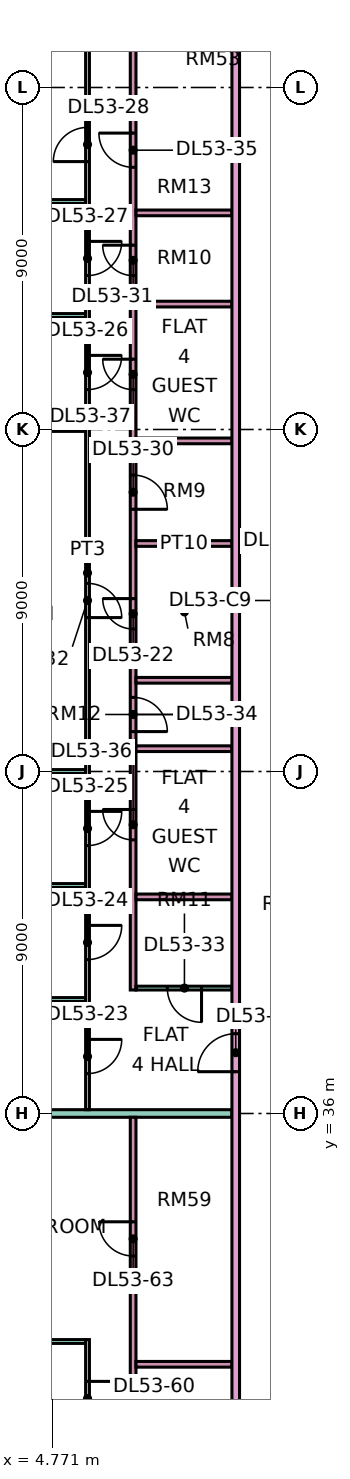
"""IFC4 building model, lengths in metres.
Left out: names, types, materials, properties, quantities, classifications, styles, units other than length and angle.
Written with IfcOpenShell. Run it as: python <this file> out.ifc"""

import sys

from ifc_helpers import new_model, si_unit, direction, frame, frame_2d, origin, place, context, subcontext, project, spatial, rectangle, extrude, element, fill, save


model = new_model("IFC4")
c1 = context("Model", 3, precision=1e-05, world=origin(), true_north=direction((0.0, 1.0)))
c2 = subcontext(c1, "Body", "Model", "MODEL_VIEW")
j1 = project(units=[si_unit("LENGTHUNIT", "METRE"), si_unit("PLANEANGLEUNIT", "RADIAN")], contexts=[c1])
p1 = place(None, origin())
s1 = spatial("IfcSite", under=j1, at=p1, CompositionType="ELEMENT")
p2 = place(p1, origin())
s2 = spatial("IfcBuilding", under=s1, at=p2, CompositionType="ELEMENT")
p3 = place(p2, frame((0.0, 0.0, 226.65)))
s3 = spatial("IfcBuildingStorey", under=s2, at=p3, CompositionType="ELEMENT", Elevation=226.65)
for number, where, z_axis, x_axis in (
    (1, (-1.351, 57.0, 0.0), (0.0, 0.0, 1.0), (1.0, 0.0, 0.0)),
    (2, (-1.351, 60.0, 0.0), (0.0, 0.0, 1.0), (1.0, 0.0, 0.0)),
):
    element("IfcWall", number, at=place(p3, frame(where, z_axis=z_axis, x_axis=x_axis)), inside=s3, PredefinedType="PARTITIONING", context=c2, shape_type="SweptSolid", body=[
        extrude(rectangle(XDim=7.001, YDim=0.1, at=frame_2d((3.5, 0.0))), origin(), (0.0, 0.0, 1.0), 3.35),
    ])
p4 = place(p3, frame((-1.35, 30.0, 0.0), z_axis=(0.0, 0.0, 1.0), x_axis=(1.0, 0.0, 0.0)))
e3 = element("IfcWall", 3, at=p4, inside=s3, PredefinedType="PARTITIONING", context=c2, shape_type="SweptSolid", body=[
    extrude(rectangle(XDim=7.0, YDim=0.1, at=frame_2d((3.5, 0.0))), origin(), (0.0, 0.0, 1.0), 3.35),
])
p5 = place(p3, frame((0.0, 36.0, 0.0), z_axis=(0.0, 0.0, 1.0), x_axis=(1.0, 0.0, 0.0)))
e4 = element("IfcWall", 4, at=p5, inside=s3, PredefinedType="PARTITIONING", context=c2, shape_type="SweptSolid", body=[
    extrude(rectangle(XDim=9.5, YDim=0.2, at=frame_2d((4.75, 0.0))), origin(), (0.0, 0.0, 1.0), 3.35),
])
p6 = place(p3, frame((0.0, 54.0, 0.0), z_axis=(0.0, 0.0, 1.0), x_axis=(1.0, 0.0, 0.0)))
e5 = element("IfcWall", 5, at=p6, inside=s3, PredefinedType="PARTITIONING", context=c2, shape_type="SweptSolid", body=[
    extrude(rectangle(XDim=5.65, YDim=0.1, at=frame_2d((2.825, 0.0))), origin(), (0.0, 0.0, 1.0), 3.35),
])
for number, where, z_axis, x_axis in (
    (6, (0.074, 39.0, 0.0), (0.0, 0.0, 1.0), (1.0, 0.0, 0.0)),
    (7, (0.074, 42.0, 0.0), (0.0, 0.0, 1.0), (1.0, 0.0, 0.0)),
    (8, (0.074, 45.0, 0.0), (0.0, 0.0, 1.0), (1.0, 0.0, 0.0)),
):
    element("IfcWall", number, at=place(p3, frame(where, z_axis=z_axis, x_axis=x_axis)), inside=s3, PredefinedType="PARTITIONING", context=c2, shape_type="SweptSolid", body=[
        extrude(rectangle(XDim=5.576, YDim=0.1, at=frame_2d((2.788, 0.0))), origin(), (0.0, 0.0, 1.0), 3.35),
    ])
p7 = place(p3, frame((5.7, 22.5, 0.0), z_axis=(0.0, 0.0, 1.0), x_axis=(0.0, 1.0, 0.0)))
e9 = element("IfcWall", 9, at=p7, inside=s3, PredefinedType="PARTITIONING", context=c2, shape_type="SweptSolid", body=[
    extrude(rectangle(XDim=7.55, YDim=0.1, at=frame_2d((3.775, 0.0))), origin(), (0.0, 0.0, 1.0), 3.35),
])
p8 = place(p7, frame((1.8, 0.0, 0.0)))
e10 = element("IfcOpeningElement", 10, at=p8, cuts=e9, PredefinedType="OPENING", context=c2, shape_type="SweptSolid", body=[
    extrude(rectangle(XDim=0.9, YDim=2.1, at=frame_2d((0.45, 1.05))), frame((0.0, 0.06, 0.0), z_axis=(0.0, -1.0, 0.0), x_axis=(1.0, 0.0, 0.0)), (0.0, 0.0, 1.0), 0.12),
])
p9 = place(p7, frame((5.55, 0.0, 0.0)))
e11 = element("IfcOpeningElement", 11, at=p9, cuts=e9, PredefinedType="OPENING", context=c2, shape_type="SweptSolid", body=[
    extrude(rectangle(XDim=0.9, YDim=2.1, at=frame_2d((0.45, 1.05))), frame((0.0, 0.06, 0.0), z_axis=(0.0, -1.0, 0.0), x_axis=(1.0, 0.0, 0.0)), (0.0, 0.0, 1.0), 0.12),
])
p10 = place(p3, frame((5.7, 36.1, 0.0), z_axis=(0.0, 0.0, 1.0), x_axis=(0.0, 1.0, 0.0)))
e12 = element("IfcWall", 12, at=p10, inside=s3, PredefinedType="PARTITIONING", context=c2, shape_type="SweptSolid", body=[
    extrude(rectangle(XDim=28.25, YDim=0.1, at=frame_2d((14.125, 0.0))), origin(), (0.0, 0.0, 1.0), 3.35),
])
p11 = place(p10, frame((0.95, 0.0, 0.0)))
e13 = element("IfcOpeningElement", 13, at=p11, cuts=e12, PredefinedType="OPENING", context=c2, shape_type="SweptSolid", body=[
    extrude(rectangle(XDim=0.9, YDim=2.1, at=frame_2d((0.45, 1.05))), frame((0.0, 0.06, 0.0), z_axis=(0.0, -1.0, 0.0), x_axis=(1.0, 0.0, 0.0)), (0.0, 0.0, 1.0), 0.12),
])
p12 = place(p10, frame((3.95, 0.0, 0.0)))
e14 = element("IfcOpeningElement", 14, at=p12, cuts=e12, PredefinedType="OPENING", context=c2, shape_type="SweptSolid", body=[
    extrude(rectangle(XDim=0.9, YDim=2.1, at=frame_2d((0.45, 1.05))), frame((0.0, 0.06, 0.0), z_axis=(0.0, -1.0, 0.0), x_axis=(1.0, 0.0, 0.0)), (0.0, 0.0, 1.0), 0.12),
])
p13 = place(p10, frame((6.95, 0.0, 0.0)))
e15 = element("IfcOpeningElement", 15, at=p13, cuts=e12, PredefinedType="OPENING", context=c2, shape_type="SweptSolid", body=[
    extrude(rectangle(XDim=0.9, YDim=2.1, at=frame_2d((0.45, 1.05))), frame((0.0, 0.06, 0.0), z_axis=(0.0, -1.0, 0.0), x_axis=(1.0, 0.0, 0.0)), (0.0, 0.0, 1.0), 0.12),
])
p14 = place(p10, frame((18.95, 0.0, 0.0)))
e16 = element("IfcOpeningElement", 16, at=p14, cuts=e12, PredefinedType="OPENING", context=c2, shape_type="SweptSolid", body=[
    extrude(rectangle(XDim=0.9, YDim=2.1, at=frame_2d((0.45, 1.05))), frame((0.0, 0.06, 0.0), z_axis=(0.0, -1.0, 0.0), x_axis=(1.0, 0.0, 0.0)), (0.0, 0.0, 1.0), 0.12),
])
p15 = place(p10, frame((21.95, 0.0, 0.0)))
e17 = element("IfcOpeningElement", 17, at=p15, cuts=e12, PredefinedType="OPENING", context=c2, shape_type="SweptSolid", body=[
    extrude(rectangle(XDim=0.9, YDim=2.1, at=frame_2d((0.45, 1.05))), frame((0.0, 0.06, 0.0), z_axis=(0.0, -1.0, 0.0), x_axis=(1.0, 0.0, 0.0)), (0.0, 0.0, 1.0), 0.12),
])
p16 = place(p10, frame((24.95, 0.0, 0.0)))
e18 = element("IfcOpeningElement", 18, at=p16, cuts=e12, PredefinedType="OPENING", context=c2, shape_type="SweptSolid", body=[
    extrude(rectangle(XDim=0.9, YDim=2.1, at=frame_2d((0.45, 1.05))), frame((0.0, 0.06, 0.0), z_axis=(0.0, -1.0, 0.0), x_axis=(1.0, 0.0, 0.0)), (0.0, 0.0, 1.0), 0.12),
])
p17 = place(p10, frame((12.95, 0.0, 0.0)))
e19 = element("IfcOpeningElement", 19, at=p17, cuts=e12, PredefinedType="OPENING", context=c2, shape_type="SweptSolid", body=[
    extrude(rectangle(XDim=0.9, YDim=2.1, at=frame_2d((0.45, 1.05))), frame((0.0, 0.06, 0.0), z_axis=(0.0, -1.0, 0.0), x_axis=(1.0, 0.0, 0.0)), (0.0, 0.0, 1.0), 0.12),
])
p18 = place(p3, frame((6.9, 26.325, 0.0), z_axis=(0.0, 0.0, 1.0), x_axis=(0.0, 1.0, 0.0)))
e20 = element("IfcWall", 20, at=p18, inside=s3, PredefinedType="PARTITIONING", context=c2, shape_type="SweptSolid", body=[
    extrude(rectangle(XDim=9.575, YDim=0.15, at=frame_2d((4.788, 0.0))), origin(), (0.0, 0.0, 1.0), 3.35),
])
p19 = place(p18, frame((1.125, 0.0, 0.0)))
e21 = element("IfcOpeningElement", 21, at=p19, cuts=e20, PredefinedType="OPENING", context=c2, shape_type="SweptSolid", body=[
    extrude(rectangle(XDim=0.8, YDim=2.1, at=frame_2d((0.4, 1.05))), frame((0.0, 0.085, 0.0), z_axis=(0.0, -1.0, 0.0), x_axis=(1.0, 0.0, 0.0)), (0.0, 0.0, 1.0), 0.17),
])
p20 = place(p18, frame((5.925, 0.0, 0.0)))
e22 = element("IfcOpeningElement", 22, at=p20, cuts=e20, PredefinedType="OPENING", context=c2, shape_type="SweptSolid", body=[
    extrude(rectangle(XDim=0.9, YDim=2.1, at=frame_2d((0.45, 1.05))), frame((0.0, 0.085, 0.0), z_axis=(0.0, -1.0, 0.0), x_axis=(1.0, 0.0, 0.0)), (0.0, 0.0, 1.0), 0.17),
])
p21 = place(p3, frame((6.9, 39.25, 0.0), z_axis=(0.0, 0.0, 1.0), x_axis=(0.0, 1.0, 0.0)))
e23 = element("IfcWall", 23, at=p21, inside=s3, PredefinedType="PARTITIONING", context=c2, shape_type="SweptSolid", body=[
    extrude(rectangle(XDim=25.1, YDim=0.15, at=frame_2d((12.55, 0.0))), origin(), (0.0, 0.0, 1.0), 3.35),
])
p22 = place(p21, frame((9.5, 0.0, 0.0)))
e24 = element("IfcOpeningElement", 24, at=p22, cuts=e23, PredefinedType="OPENING", context=c2, shape_type="SweptSolid", body=[
    extrude(rectangle(XDim=0.8, YDim=2.1, at=frame_2d((0.4, 1.05))), frame((0.0, 0.085, 0.0), z_axis=(0.0, -1.0, 0.0), x_axis=(1.0, 0.0, 0.0)), (0.0, 0.0, 1.0), 0.17),
])
p23 = place(p21, frame((12.65, 0.0, 0.0)))
e25 = element("IfcOpeningElement", 25, at=p23, cuts=e23, PredefinedType="OPENING", context=c2, shape_type="SweptSolid", body=[
    extrude(rectangle(XDim=0.9, YDim=2.1, at=frame_2d((0.45, 1.05))), frame((0.0, 0.085, 0.0), z_axis=(0.0, -1.0, 0.0), x_axis=(1.0, 0.0, 0.0)), (0.0, 0.0, 1.0), 0.17),
])
p24 = place(p21, frame((18.8, 0.0, 0.0)))
e26 = element("IfcOpeningElement", 26, at=p24, cuts=e23, PredefinedType="OPENING", context=c2, shape_type="SweptSolid", body=[
    extrude(rectangle(XDim=0.8, YDim=2.1, at=frame_2d((0.4, 1.05))), frame((0.0, 0.085, 0.0), z_axis=(0.0, -1.0, 0.0), x_axis=(1.0, 0.0, 0.0)), (0.0, 0.0, 1.0), 0.17),
])
p25 = place(p21, frame((6.8, 0.0, 0.0)))
e27 = element("IfcOpeningElement", 27, at=p25, cuts=e23, PredefinedType="OPENING", context=c2, shape_type="SweptSolid", body=[
    extrude(rectangle(XDim=0.9, YDim=2.1, at=frame_2d((0.45, 1.05))), frame((0.0, 0.085, 0.0), z_axis=(0.0, -1.0, 0.0), x_axis=(1.0, 0.0, 0.0)), (0.0, 0.0, 1.0), 0.17),
])
p26 = place(p21, frame((21.65, 0.0, 0.0)))
e28 = element("IfcOpeningElement", 28, at=p26, cuts=e23, PredefinedType="OPENING", context=c2, shape_type="SweptSolid", body=[
    extrude(rectangle(XDim=0.9, YDim=2.1, at=frame_2d((0.45, 1.05))), frame((0.0, 0.085, 0.0), z_axis=(0.0, -1.0, 0.0), x_axis=(1.0, 0.0, 0.0)), (0.0, 0.0, 1.0), 0.17),
])
p27 = place(p21, frame((3.95, 0.0, 0.0)))
e29 = element("IfcOpeningElement", 29, at=p27, cuts=e23, PredefinedType="OPENING", context=c2, shape_type="SweptSolid", body=[
    extrude(rectangle(XDim=0.8, YDim=2.1, at=frame_2d((0.4, 1.05))), frame((0.0, 0.085, 0.0), z_axis=(0.0, -1.0, 0.0), x_axis=(1.0, 0.0, 0.0)), (0.0, 0.0, 1.0), 0.17),
])
p28 = place(p21, frame((15.8, 0.0, 0.0)))
e30 = element("IfcOpeningElement", 30, at=p28, cuts=e23, PredefinedType="OPENING", context=c2, shape_type="SweptSolid", body=[
    extrude(rectangle(XDim=0.8, YDim=2.1, at=frame_2d((0.4, 1.05))), frame((0.0, 0.085, 0.0), z_axis=(0.0, -1.0, 0.0), x_axis=(1.0, 0.0, 0.0)), (0.0, 0.0, 1.0), 0.17),
])
p29 = place(p3, frame((6.975, 29.4, 0.0), z_axis=(0.0, 0.0, 1.0), x_axis=(1.0, 0.0, 0.0)))
e31 = element("IfcWall", 31, at=p29, inside=s3, PredefinedType="PARTITIONING", context=c2, shape_type="SweptSolid", body=[
    extrude(rectangle(XDim=2.525, YDim=0.15, at=frame_2d((1.262, 0.0))), origin(), (0.0, 0.0, 1.0), 3.35),
])
p30 = place(p3, frame((6.975, 39.3, 0.0), z_axis=(0.0, 0.0, 1.0), x_axis=(1.0, 0.0, 0.0)))
e32 = element("IfcWall", 32, at=p30, inside=s3, PredefinedType="PARTITIONING", context=c2, shape_type="SweptSolid", body=[
    extrude(rectangle(XDim=2.525, YDim=0.1, at=frame_2d((1.262, 0.0))), origin(), (0.0, 0.0, 1.0), 3.35),
])
p31 = place(p30, frame((0.825, 0.0, 0.0)))
e33 = element("IfcOpeningElement", 33, at=p31, cuts=e32, PredefinedType="OPENING", context=c2, shape_type="SweptSolid", body=[
    extrude(rectangle(XDim=0.9, YDim=2.1, at=frame_2d((0.45, 1.05))), frame((0.0, 0.06, 0.0), z_axis=(0.0, -1.0, 0.0), x_axis=(1.0, 0.0, 0.0)), (0.0, 0.0, 1.0), 0.12),
])
for number, where, z_axis, x_axis in (
    (34, (6.975, 41.7, 0.0), (0.0, 0.0, 1.0), (1.0, 0.0, 0.0)),
    (35, (6.975, 45.6, 0.0), (0.0, 0.0, 1.0), (1.0, 0.0, 0.0)),
    (36, (6.975, 47.4, 0.0), (0.0, 0.0, 1.0), (1.0, 0.0, 0.0)),
    (37, (6.975, 51.0, 0.0), (0.0, 0.0, 1.0), (1.0, 0.0, 0.0)),
    (38, (6.975, 53.7, 0.0), (0.0, 0.0, 1.0), (1.0, 0.0, 0.0)),
    (39, (6.975, 57.3, 0.0), (0.0, 0.0, 1.0), (1.0, 0.0, 0.0)),
    (40, (6.975, 59.7, 0.0), (0.0, 0.0, 1.0), (1.0, 0.0, 0.0)),
):
    element("IfcWall", number, at=place(p3, frame(where, z_axis=z_axis, x_axis=x_axis)), inside=s3, PredefinedType="PARTITIONING", context=c2, shape_type="SweptSolid", body=[
        extrude(rectangle(XDim=2.525, YDim=0.15, at=frame_2d((1.262, 0.0))), origin(), (0.0, 0.0, 1.0), 3.35),
    ])
p32 = place(p3, frame((9.6, 20.0, 0.0), z_axis=(0.0, 0.0, 1.0), x_axis=(0.0, 1.0, 0.0)))
e41 = element("IfcWall", 41, at=p32, inside=s3, PredefinedType="PARTITIONING", context=c2, shape_type="SweptSolid", body=[
    extrude(rectangle(XDim=44.35, YDim=0.2, at=frame_2d((22.175, 0.0))), origin(), (0.0, 0.0, 1.0), 3.35),
])
p33 = place(p32, frame((17.1, 0.0, 0.0)))
e42 = element("IfcOpeningElement", 42, at=p33, cuts=e41, PredefinedType="OPENING", context=c2, shape_type="SweptSolid", body=[
    extrude(rectangle(XDim=1.0, YDim=2.1, at=frame_2d((0.5, 1.05))), frame((0.0, 0.11, 0.0), z_axis=(0.0, -1.0, 0.0), x_axis=(1.0, 0.0, 0.0)), (0.0, 0.0, 1.0), 0.22),
])
p34 = place(p32, frame((0.6, 0.0, 0.0)))
e43 = element("IfcOpeningElement", 43, at=p34, cuts=e41, PredefinedType="OPENING", context=c2, shape_type="SweptSolid", body=[
    extrude(rectangle(XDim=1.2, YDim=2.1, at=frame_2d((0.6, 1.05))), frame((0.0, 0.11, 0.0), z_axis=(0.0, -1.0, 0.0), x_axis=(1.0, 0.0, 0.0)), (0.0, 0.0, 1.0), 0.22),
])
p35 = place(p32, frame((3.9, 0.0, 0.0)))
e44 = element("IfcOpeningElement", 44, at=p35, cuts=e41, PredefinedType="OPENING", context=c2, shape_type="SweptSolid", body=[
    extrude(rectangle(XDim=1.0, YDim=2.1, at=frame_2d((0.5, 1.05))), frame((0.0, 0.11, 0.0), z_axis=(0.0, -1.0, 0.0), x_axis=(1.0, 0.0, 0.0)), (0.0, 0.0, 1.0), 0.22),
])
p36 = place(p22, frame((0.8, 0.0, 0.0), z_axis=(0.0, 0.0, 1.0), x_axis=(-1.0, 0.0, 0.0)))
e45 = element("IfcDoor", 45, at=p36, inside=s3, OperationType="SINGLE_SWING_RIGHT", PredefinedType="DOOR", context=c2, shape_type="SweptSolid", body=[
    extrude(rectangle(XDim=0.8, YDim=2.1, at=frame_2d((0.4, 1.05))), frame((0.0, 0.025, 0.0), z_axis=(0.0, -1.0, 0.0), x_axis=(1.0, 0.0, 0.0)), (0.0, 0.0, 1.0), 0.05),
])
fill(e24, e45)
p37 = place(p11, origin())
e46 = element("IfcDoor", 46, at=p37, inside=s3, OperationType="SINGLE_SWING_RIGHT", PredefinedType="DOOR", context=c2, shape_type="SweptSolid", body=[
    extrude(rectangle(XDim=0.9, YDim=2.1, at=frame_2d((0.45, 1.05))), frame((0.0, 0.025, 0.0), z_axis=(0.0, -1.0, 0.0), x_axis=(1.0, 0.0, 0.0)), (0.0, 0.0, 1.0), 0.05),
])
fill(e13, e46)
p38 = place(p12, origin())
e47 = element("IfcDoor", 47, at=p38, inside=s3, OperationType="SINGLE_SWING_RIGHT", PredefinedType="DOOR", context=c2, shape_type="SweptSolid", body=[
    extrude(rectangle(XDim=0.9, YDim=2.1, at=frame_2d((0.45, 1.05))), frame((0.0, 0.025, 0.0), z_axis=(0.0, -1.0, 0.0), x_axis=(1.0, 0.0, 0.0)), (0.0, 0.0, 1.0), 0.05),
])
fill(e14, e47)
p39 = place(p13, origin())
e48 = element("IfcDoor", 48, at=p39, inside=s3, OperationType="SINGLE_SWING_RIGHT", PredefinedType="DOOR", context=c2, shape_type="SweptSolid", body=[
    extrude(rectangle(XDim=0.9, YDim=2.1, at=frame_2d((0.45, 1.05))), frame((0.0, 0.025, 0.0), z_axis=(0.0, -1.0, 0.0), x_axis=(1.0, 0.0, 0.0)), (0.0, 0.0, 1.0), 0.05),
])
fill(e15, e48)
p40 = place(p14, origin())
e49 = element("IfcDoor", 49, at=p40, inside=s3, OperationType="SINGLE_SWING_RIGHT", PredefinedType="DOOR", context=c2, shape_type="SweptSolid", body=[
    extrude(rectangle(XDim=0.9, YDim=2.1, at=frame_2d((0.45, 1.05))), frame((0.0, 0.025, 0.0), z_axis=(0.0, -1.0, 0.0), x_axis=(1.0, 0.0, 0.0)), (0.0, 0.0, 1.0), 0.05),
])
fill(e16, e49)
p41 = place(p15, origin())
e50 = element("IfcDoor", 50, at=p41, inside=s3, OperationType="SINGLE_SWING_RIGHT", PredefinedType="DOOR", context=c2, shape_type="SweptSolid", body=[
    extrude(rectangle(XDim=0.9, YDim=2.1, at=frame_2d((0.45, 1.05))), frame((0.0, 0.025, 0.0), z_axis=(0.0, -1.0, 0.0), x_axis=(1.0, 0.0, 0.0)), (0.0, 0.0, 1.0), 0.05),
])
fill(e17, e50)
p42 = place(p16, origin())
e51 = element("IfcDoor", 51, at=p42, inside=s3, OperationType="SINGLE_SWING_LEFT", PredefinedType="DOOR", context=c2, shape_type="SweptSolid", body=[
    extrude(rectangle(XDim=0.9, YDim=2.1, at=frame_2d((0.45, 1.05))), frame((0.0, 0.025, 0.0), z_axis=(0.0, -1.0, 0.0), x_axis=(1.0, 0.0, 0.0)), (0.0, 0.0, 1.0), 0.05),
])
fill(e18, e51)
p43 = place(p33, origin())
e52 = element("IfcDoor", 52, at=p43, inside=s3, OperationType="SINGLE_SWING_LEFT", PredefinedType="DOOR", context=c2, shape_type="SweptSolid", body=[
    extrude(rectangle(XDim=1.0, YDim=2.1, at=frame_2d((0.5, 1.05))), frame((0.0, 0.025, 0.0), z_axis=(0.0, -1.0, 0.0), x_axis=(1.0, 0.0, 0.0)), (0.0, 0.0, 1.0), 0.05),
])
fill(e42, e52)
p44 = place(p23, frame((0.9, 0.0, 0.0), z_axis=(0.0, 0.0, 1.0), x_axis=(-1.0, 0.0, 0.0)))
e53 = element("IfcDoor", 53, at=p44, inside=s3, OperationType="SINGLE_SWING_LEFT", PredefinedType="DOOR", context=c2, shape_type="SweptSolid", body=[
    extrude(rectangle(XDim=0.9, YDim=2.1, at=frame_2d((0.45, 1.05))), frame((0.0, 0.025, 0.0), z_axis=(0.0, -1.0, 0.0), x_axis=(1.0, 0.0, 0.0)), (0.0, 0.0, 1.0), 0.05),
])
fill(e25, e53)
p45 = place(p24, frame((0.8, 0.0, 0.0), z_axis=(0.0, 0.0, 1.0), x_axis=(-1.0, 0.0, 0.0)))
e54 = element("IfcDoor", 54, at=p45, inside=s3, OperationType="SINGLE_SWING_RIGHT", PredefinedType="DOOR", context=c2, shape_type="SweptSolid", body=[
    extrude(rectangle(XDim=0.8, YDim=2.1, at=frame_2d((0.4, 1.05))), frame((0.0, 0.025, 0.0), z_axis=(0.0, -1.0, 0.0), x_axis=(1.0, 0.0, 0.0)), (0.0, 0.0, 1.0), 0.05),
])
fill(e26, e54)
p46 = place(p17, frame((0.9, 0.0, 0.0), z_axis=(0.0, 0.0, 1.0), x_axis=(-1.0, 0.0, 0.0)))
e55 = element("IfcDoor", 55, at=p46, inside=s3, OperationType="SINGLE_SWING_LEFT", PredefinedType="DOOR", context=c2, shape_type="SweptSolid", body=[
    extrude(rectangle(XDim=0.9, YDim=2.1, at=frame_2d((0.45, 1.05))), frame((0.0, 0.025, 0.0), z_axis=(0.0, -1.0, 0.0), x_axis=(1.0, 0.0, 0.0)), (0.0, 0.0, 1.0), 0.05),
])
fill(e19, e55)
p47 = place(p31, origin())
e56 = element("IfcDoor", 56, at=p47, inside=s3, OperationType="SINGLE_SWING_RIGHT", PredefinedType="DOOR", context=c2, shape_type="SweptSolid", body=[
    extrude(rectangle(XDim=0.9, YDim=2.1, at=frame_2d((0.45, 1.05))), frame((0.0, 0.025, 0.0), z_axis=(0.0, -1.0, 0.0), x_axis=(1.0, 0.0, 0.0)), (0.0, 0.0, 1.0), 0.05),
])
fill(e33, e56)
p48 = place(p25, frame((0.9, 0.0, 0.0), z_axis=(0.0, 0.0, 1.0), x_axis=(-1.0, 0.0, 0.0)))
e57 = element("IfcDoor", 57, at=p48, inside=s3, OperationType="SINGLE_SWING_LEFT", PredefinedType="DOOR", context=c2, shape_type="SweptSolid", body=[
    extrude(rectangle(XDim=0.9, YDim=2.1, at=frame_2d((0.45, 1.05))), frame((0.0, 0.025, 0.0), z_axis=(0.0, -1.0, 0.0), x_axis=(1.0, 0.0, 0.0)), (0.0, 0.0, 1.0), 0.05),
])
fill(e27, e57)
p49 = place(p26, frame((0.9, 0.0, 0.0), z_axis=(0.0, 0.0, 1.0), x_axis=(-1.0, 0.0, 0.0)))
e58 = element("IfcDoor", 58, at=p49, inside=s3, OperationType="SINGLE_SWING_RIGHT", PredefinedType="DOOR", context=c2, shape_type="SweptSolid", body=[
    extrude(rectangle(XDim=0.9, YDim=2.1, at=frame_2d((0.45, 1.05))), frame((0.0, 0.025, 0.0), z_axis=(0.0, -1.0, 0.0), x_axis=(1.0, 0.0, 0.0)), (0.0, 0.0, 1.0), 0.05),
])
fill(e28, e58)
p50 = place(p27, frame((0.8, 0.0, 0.0), z_axis=(0.0, 0.0, 1.0), x_axis=(-1.0, 0.0, 0.0)))
e59 = element("IfcDoor", 59, at=p50, inside=s3, OperationType="SINGLE_SWING_RIGHT", PredefinedType="DOOR", context=c2, shape_type="SweptSolid", body=[
    extrude(rectangle(XDim=0.8, YDim=2.1, at=frame_2d((0.4, 1.05))), frame((0.0, 0.025, 0.0), z_axis=(0.0, -1.0, 0.0), x_axis=(1.0, 0.0, 0.0)), (0.0, 0.0, 1.0), 0.05),
])
fill(e29, e59)
p51 = place(p28, frame((0.8, 0.0, 0.0), z_axis=(0.0, 0.0, 1.0), x_axis=(-1.0, 0.0, 0.0)))
e60 = element("IfcDoor", 60, at=p51, inside=s3, OperationType="SINGLE_SWING_RIGHT", PredefinedType="DOOR", context=c2, shape_type="SweptSolid", body=[
    extrude(rectangle(XDim=0.8, YDim=2.1, at=frame_2d((0.4, 1.05))), frame((0.0, 0.025, 0.0), z_axis=(0.0, -1.0, 0.0), x_axis=(1.0, 0.0, 0.0)), (0.0, 0.0, 1.0), 0.05),
])
fill(e30, e60)
p52 = place(p9, origin())
e61 = element("IfcDoor", 61, at=p52, inside=s3, OperationType="SINGLE_SWING_RIGHT", PredefinedType="DOOR", context=c2, shape_type="SweptSolid", body=[
    extrude(rectangle(XDim=0.9, YDim=2.1, at=frame_2d((0.45, 1.05))), frame((0.0, 0.025, 0.0), z_axis=(0.0, -1.0, 0.0), x_axis=(1.0, 0.0, 0.0)), (0.0, 0.0, 1.0), 0.05),
])
fill(e11, e61)
p53 = place(p20, frame((0.9, 0.0, 0.0), z_axis=(0.0, 0.0, 1.0), x_axis=(-1.0, 0.0, 0.0)))
e62 = element("IfcDoor", 62, at=p53, inside=s3, OperationType="SINGLE_SWING_RIGHT", PredefinedType="DOOR", context=c2, shape_type="SweptSolid", body=[
    extrude(rectangle(XDim=0.9, YDim=2.1, at=frame_2d((0.45, 1.05))), frame((0.0, 0.025, 0.0), z_axis=(0.0, -1.0, 0.0), x_axis=(1.0, 0.0, 0.0)), (0.0, 0.0, 1.0), 0.05),
])
fill(e22, e62)
save(model, sys.argv[1])
